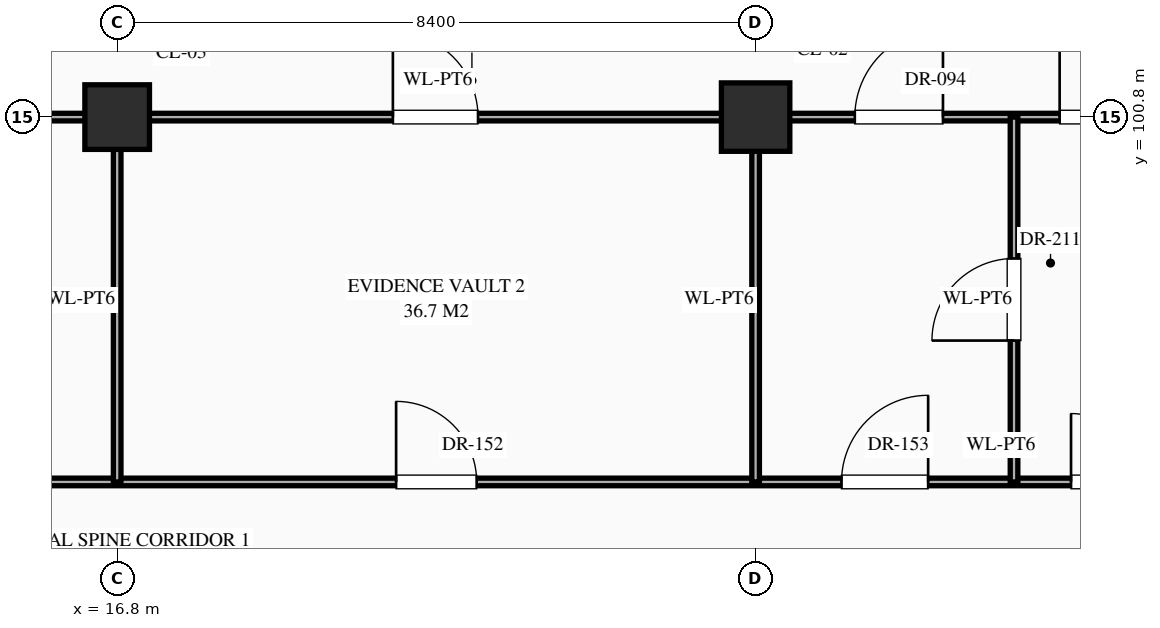
"""IFC4 building model, lengths in metres.
Left out: names, types, materials, properties, quantities, classifications, styles, units other than length and angle.
Written with IfcOpenShell. Run it as: python <this file> out.ifc"""

import sys

from ifc_helpers import new_model, si_unit, direction, frame, frame_2d, origin, origin_2d, place, context, subcontext, project, spatial, rectangle, extrude, element, fill, save


model = new_model("IFC4")
c1 = context("Model", 3, precision=1e-05, world=origin(), true_north=direction((0.0, 1.0)))
c2 = subcontext(c1, "Body", "Model", "MODEL_VIEW")
j1 = project(units=[si_unit("LENGTHUNIT", "METRE"), si_unit("PLANEANGLEUNIT", "RADIAN")], contexts=[c1])
p1 = place(None, origin())
s1 = spatial("IfcSite", under=j1, at=p1, CompositionType="ELEMENT")
p2 = place(p1, origin())
s2 = spatial("IfcBuilding", under=s1, at=p2, CompositionType="ELEMENT")
p3 = place(p2, frame((0.0, 0.0, -10.2)))
s3 = spatial("IfcBuildingStorey", under=s2, at=p3, CompositionType="ELEMENT", Elevation=-10.2)
p4 = place(p3, frame((16.8, 100.8, 0.0), z_axis=(0.0, 0.0, 1.0), x_axis=(1.0, 0.0, 0.0)))
e1 = element("IfcColumn", 1, at=p4, inside=s3, PredefinedType="COLUMN", context=c2, shape_type="SweptSolid", body=[
    extrude(rectangle(XDim=0.85, YDim=0.85, at=origin_2d()), origin(), (0.0, 0.0, 1.0), 4.8),
])
p5 = place(p3, frame((25.2, 100.8, 0.0), z_axis=(0.0, 0.0, 1.0), x_axis=(1.0, 0.0, 0.0)))
e2 = element("IfcColumn", 2, at=p5, inside=s3, PredefinedType="COLUMN", context=c2, shape_type="SweptSolid", body=[
    extrude(rectangle(XDim=0.9, YDim=0.9, at=origin_2d()), origin(), (0.0, 0.0, 1.0), 4.8),
])
p6 = place(p3, frame((0.04, 96.0, 0.0), z_axis=(0.0, 0.0, 1.0), x_axis=(1.0, 0.0, 0.0)))
e3 = element("IfcWall", 3, at=p6, inside=s3, PredefinedType="STANDARD", context=c2, shape_type="SweptSolid", body=[
    extrude(rectangle(XDim=151.16, YDim=0.1, at=frame_2d((75.58, 0.0))), origin(), (0.0, 0.0, 1.0), 4.48),
])
p7 = place(p6, frame((1.04, 0.0, 0.0)))
e4 = element("IfcOpeningElement", 4, at=p7, cuts=e3, PredefinedType="OPENING", context=c2, shape_type="SweptSolid", body=[
    extrude(rectangle(XDim=1.28, YDim=2.35, at=frame_2d((0.64, 1.175))), frame((0.0, 0.062, 0.0), z_axis=(0.0, -1.0, 0.0), x_axis=(1.0, 0.0, 0.0)), (0.0, 0.0, 1.0), 0.124),
])
p8 = place(p6, frame((4.09, 0.0, 0.0)))
e5 = element("IfcOpeningElement", 5, at=p8, cuts=e3, PredefinedType="OPENING", context=c2, shape_type="SweptSolid", body=[
    extrude(rectangle(XDim=0.94, YDim=2.3, at=frame_2d((0.47, 1.15))), frame((0.0, 0.062, 0.0), z_axis=(0.0, -1.0, 0.0), x_axis=(1.0, 0.0, 0.0)), (0.0, 0.0, 1.0), 0.124),
])
p9 = place(p6, frame((6.57, 0.0, 0.0)))
e6 = element("IfcOpeningElement", 6, at=p9, cuts=e3, PredefinedType="OPENING", context=c2, shape_type="SweptSolid", body=[
    extrude(rectangle(XDim=0.98, YDim=2.35, at=frame_2d((0.49, 1.175))), frame((0.0, 0.062, 0.0), z_axis=(0.0, -1.0, 0.0), x_axis=(1.0, 0.0, 0.0)), (0.0, 0.0, 1.0), 0.124),
])
p10 = place(p6, frame((12.05, 0.0, 0.0)))
e7 = element("IfcOpeningElement", 7, at=p10, cuts=e3, PredefinedType="OPENING", context=c2, shape_type="SweptSolid", body=[
    extrude(rectangle(XDim=1.02, YDim=2.4, at=frame_2d((0.51, 1.2))), frame((0.0, 0.062, 0.0), z_axis=(0.0, -1.0, 0.0), x_axis=(1.0, 0.0, 0.0)), (0.0, 0.0, 1.0), 0.124),
])
p11 = place(p6, frame((20.43, 0.0, 0.0)))
e8 = element("IfcOpeningElement", 8, at=p11, cuts=e3, PredefinedType="OPENING", context=c2, shape_type="SweptSolid", body=[
    extrude(rectangle(XDim=1.06, YDim=2.4, at=frame_2d((0.53, 1.2))), frame((0.0, 0.062, 0.0), z_axis=(0.0, -1.0, 0.0), x_axis=(1.0, 0.0, 0.0)), (0.0, 0.0, 1.0), 0.124),
])
p12 = place(p6, frame((26.29, 0.0, 0.0)))
e9 = element("IfcOpeningElement", 9, at=p12, cuts=e3, PredefinedType="OPENING", context=c2, shape_type="SweptSolid", body=[
    extrude(rectangle(XDim=1.14, YDim=2.4, at=frame_2d((0.57, 1.2))), frame((0.0, 0.062, 0.0), z_axis=(0.0, -1.0, 0.0), x_axis=(1.0, 0.0, 0.0)), (0.0, 0.0, 1.0), 0.124),
])
p13 = place(p6, frame((29.31, 0.0, 0.0)))
e10 = element("IfcOpeningElement", 10, at=p13, cuts=e3, PredefinedType="OPENING", context=c2, shape_type="SweptSolid", body=[
    extrude(rectangle(XDim=0.9, YDim=2.15, at=frame_2d((0.45, 1.075))), frame((0.0, 0.062, 0.0), z_axis=(0.0, -1.0, 0.0), x_axis=(1.0, 0.0, 0.0)), (0.0, 0.0, 1.0), 0.124),
])
p14 = place(p6, frame((31.83, 0.0, 0.0)))
e11 = element("IfcOpeningElement", 11, at=p14, cuts=e3, PredefinedType="OPENING", context=c2, shape_type="SweptSolid", body=[
    extrude(rectangle(XDim=0.86, YDim=2.1, at=frame_2d((0.43, 1.05))), frame((0.0, 0.062, 0.0), z_axis=(0.0, -1.0, 0.0), x_axis=(1.0, 0.0, 0.0)), (0.0, 0.0, 1.0), 0.124),
])
p15 = place(p6, frame((37.3, 0.0, 0.0)))
e12 = element("IfcOpeningElement", 12, at=p15, cuts=e3, PredefinedType="OPENING", context=c2, shape_type="SweptSolid", body=[
    extrude(rectangle(XDim=0.92, YDim=2.15, at=frame_2d((0.46, 1.075))), frame((0.0, 0.062, 0.0), z_axis=(0.0, -1.0, 0.0), x_axis=(1.0, 0.0, 0.0)), (0.0, 0.0, 1.0), 0.124),
])
p16 = place(p6, frame((45.68, 0.0, 0.0)))
e13 = element("IfcOpeningElement", 13, at=p16, cuts=e3, PredefinedType="OPENING", context=c2, shape_type="SweptSolid", body=[
    extrude(rectangle(XDim=0.96, YDim=2.2, at=frame_2d((0.48, 1.1))), frame((0.0, 0.062, 0.0), z_axis=(0.0, -1.0, 0.0), x_axis=(1.0, 0.0, 0.0)), (0.0, 0.0, 1.0), 0.124),
])
p17 = place(p6, frame((51.57, 0.0, 0.0)))
e14 = element("IfcOpeningElement", 14, at=p17, cuts=e3, PredefinedType="OPENING", context=c2, shape_type="SweptSolid", body=[
    extrude(rectangle(XDim=0.98, YDim=2.35, at=frame_2d((0.49, 1.175))), frame((0.0, 0.062, 0.0), z_axis=(0.0, -1.0, 0.0), x_axis=(1.0, 0.0, 0.0)), (0.0, 0.0, 1.0), 0.124),
])
p18 = place(p6, frame((54.45, 0.0, 0.0)))
e15 = element("IfcOpeningElement", 15, at=p18, cuts=e3, PredefinedType="OPENING", context=c2, shape_type="SweptSolid", body=[
    extrude(rectangle(XDim=1.02, YDim=2.4, at=frame_2d((0.51, 1.2))), frame((0.0, 0.062, 0.0), z_axis=(0.0, -1.0, 0.0), x_axis=(1.0, 0.0, 0.0)), (0.0, 0.0, 1.0), 0.124),
])
p19 = place(p6, frame((56.93, 0.0, 0.0)))
e16 = element("IfcOpeningElement", 16, at=p19, cuts=e3, PredefinedType="OPENING", context=c2, shape_type="SweptSolid", body=[
    extrude(rectangle(XDim=1.06, YDim=2.4, at=frame_2d((0.53, 1.2))), frame((0.0, 0.062, 0.0), z_axis=(0.0, -1.0, 0.0), x_axis=(1.0, 0.0, 0.0)), (0.0, 0.0, 1.0), 0.124),
])
p20 = place(p6, frame((62.39, 0.0, 0.0)))
e17 = element("IfcOpeningElement", 17, at=p20, cuts=e3, PredefinedType="OPENING", context=c2, shape_type="SweptSolid", body=[
    extrude(rectangle(XDim=1.14, YDim=2.4, at=frame_2d((0.57, 1.2))), frame((0.0, 0.062, 0.0), z_axis=(0.0, -1.0, 0.0), x_axis=(1.0, 0.0, 0.0)), (0.0, 0.0, 1.0), 0.124),
])
p21 = place(p6, frame((70.91, 0.0, 0.0)))
e18 = element("IfcOpeningElement", 18, at=p21, cuts=e3, PredefinedType="OPENING", context=c2, shape_type="SweptSolid", body=[
    extrude(rectangle(XDim=0.9, YDim=2.15, at=frame_2d((0.45, 1.075))), frame((0.0, 0.062, 0.0), z_axis=(0.0, -1.0, 0.0), x_axis=(1.0, 0.0, 0.0)), (0.0, 0.0, 1.0), 0.124),
])
p22 = place(p6, frame((79.33, 0.0, 0.0)))
e19 = element("IfcOpeningElement", 19, at=p22, cuts=e3, PredefinedType="OPENING", context=c2, shape_type="SweptSolid", body=[
    extrude(rectangle(XDim=0.86, YDim=2.1, at=frame_2d((0.43, 1.05))), frame((0.0, 0.062, 0.0), z_axis=(0.0, -1.0, 0.0), x_axis=(1.0, 0.0, 0.0)), (0.0, 0.0, 1.0), 0.124),
])
p23 = place(p6, frame((85.1, 0.0, 0.0)))
e20 = element("IfcOpeningElement", 20, at=p23, cuts=e3, PredefinedType="OPENING", context=c2, shape_type="SweptSolid", body=[
    extrude(rectangle(XDim=1.12, YDim=2.25, at=frame_2d((0.56, 1.125))), frame((0.0, 0.062, 0.0), z_axis=(0.0, -1.0, 0.0), x_axis=(1.0, 0.0, 0.0)), (0.0, 0.0, 1.0), 0.124),
])
p24 = place(p6, frame((87.98, 0.0, 0.0)))
e21 = element("IfcOpeningElement", 21, at=p24, cuts=e3, PredefinedType="OPENING", context=c2, shape_type="SweptSolid", body=[
    extrude(rectangle(XDim=1.16, YDim=2.3, at=frame_2d((0.58, 1.15))), frame((0.0, 0.062, 0.0), z_axis=(0.0, -1.0, 0.0), x_axis=(1.0, 0.0, 0.0)), (0.0, 0.0, 1.0), 0.124),
])
p25 = place(p6, frame((90.46, 0.0, 0.0)))
e22 = element("IfcOpeningElement", 22, at=p25, cuts=e3, PredefinedType="OPENING", context=c2, shape_type="SweptSolid", body=[
    extrude(rectangle(XDim=1.2, YDim=2.35, at=frame_2d((0.6, 1.175))), frame((0.0, 0.062, 0.0), z_axis=(0.0, -1.0, 0.0), x_axis=(1.0, 0.0, 0.0)), (0.0, 0.0, 1.0), 0.124),
])
p26 = place(p6, frame((95.94, 0.0, 0.0)))
e23 = element("IfcOpeningElement", 23, at=p26, cuts=e3, PredefinedType="OPENING", context=c2, shape_type="SweptSolid", body=[
    extrude(rectangle(XDim=1.24, YDim=2.3, at=frame_2d((0.62, 1.15))), frame((0.0, 0.062, 0.0), z_axis=(0.0, -1.0, 0.0), x_axis=(1.0, 0.0, 0.0)), (0.0, 0.0, 1.0), 0.124),
])
p27 = place(p6, frame((104.32, 0.0, 0.0)))
e24 = element("IfcOpeningElement", 24, at=p27, cuts=e3, PredefinedType="OPENING", context=c2, shape_type="SweptSolid", body=[
    extrude(rectangle(XDim=1.28, YDim=2.35, at=frame_2d((0.64, 1.175))), frame((0.0, 0.062, 0.0), z_axis=(0.0, -1.0, 0.0), x_axis=(1.0, 0.0, 0.0)), (0.0, 0.0, 1.0), 0.124),
])
p28 = place(p6, frame((110.39, 0.0, 0.0)))
e25 = element("IfcOpeningElement", 25, at=p28, cuts=e3, PredefinedType="OPENING", context=c2, shape_type="SweptSolid", body=[
    extrude(rectangle(XDim=0.94, YDim=2.3, at=frame_2d((0.47, 1.15))), frame((0.0, 0.062, 0.0), z_axis=(0.0, -1.0, 0.0), x_axis=(1.0, 0.0, 0.0)), (0.0, 0.0, 1.0), 0.124),
])
p29 = place(p6, frame((113.27, 0.0, 0.0)))
e26 = element("IfcOpeningElement", 26, at=p29, cuts=e3, PredefinedType="OPENING", context=c2, shape_type="SweptSolid", body=[
    extrude(rectangle(XDim=0.98, YDim=2.35, at=frame_2d((0.49, 1.175))), frame((0.0, 0.062, 0.0), z_axis=(0.0, -1.0, 0.0), x_axis=(1.0, 0.0, 0.0)), (0.0, 0.0, 1.0), 0.124),
])
p30 = place(p6, frame((115.75, 0.0, 0.0)))
e27 = element("IfcOpeningElement", 27, at=p30, cuts=e3, PredefinedType="OPENING", context=c2, shape_type="SweptSolid", body=[
    extrude(rectangle(XDim=1.02, YDim=2.4, at=frame_2d((0.51, 1.2))), frame((0.0, 0.062, 0.0), z_axis=(0.0, -1.0, 0.0), x_axis=(1.0, 0.0, 0.0)), (0.0, 0.0, 1.0), 0.124),
])
p31 = place(p6, frame((121.24, 0.0, 0.0)))
e28 = element("IfcOpeningElement", 28, at=p31, cuts=e3, PredefinedType="OPENING", context=c2, shape_type="SweptSolid", body=[
    extrude(rectangle(XDim=1.04, YDim=2.2, at=frame_2d((0.52, 1.1))), frame((0.0, 0.062, 0.0), z_axis=(0.0, -1.0, 0.0), x_axis=(1.0, 0.0, 0.0)), (0.0, 0.0, 1.0), 0.124),
])
p32 = place(p6, frame((129.62, 0.0, 0.0)))
e29 = element("IfcOpeningElement", 29, at=p32, cuts=e3, PredefinedType="OPENING", context=c2, shape_type="SweptSolid", body=[
    extrude(rectangle(XDim=1.08, YDim=2.25, at=frame_2d((0.54, 1.125))), frame((0.0, 0.062, 0.0), z_axis=(0.0, -1.0, 0.0), x_axis=(1.0, 0.0, 0.0)), (0.0, 0.0, 1.0), 0.124),
])
p33 = place(p6, frame((135.5, 0.0, 0.0)))
e30 = element("IfcOpeningElement", 30, at=p33, cuts=e3, PredefinedType="OPENING", context=c2, shape_type="SweptSolid", body=[
    extrude(rectangle(XDim=1.12, YDim=2.25, at=frame_2d((0.56, 1.125))), frame((0.0, 0.062, 0.0), z_axis=(0.0, -1.0, 0.0), x_axis=(1.0, 0.0, 0.0)), (0.0, 0.0, 1.0), 0.124),
])
p34 = place(p6, frame((138.38, 0.0, 0.0)))
e31 = element("IfcOpeningElement", 31, at=p34, cuts=e3, PredefinedType="OPENING", context=c2, shape_type="SweptSolid", body=[
    extrude(rectangle(XDim=1.16, YDim=2.3, at=frame_2d((0.58, 1.15))), frame((0.0, 0.062, 0.0), z_axis=(0.0, -1.0, 0.0), x_axis=(1.0, 0.0, 0.0)), (0.0, 0.0, 1.0), 0.124),
])
p35 = place(p6, frame((140.86, 0.0, 0.0)))
e32 = element("IfcOpeningElement", 32, at=p35, cuts=e3, PredefinedType="OPENING", context=c2, shape_type="SweptSolid", body=[
    extrude(rectangle(XDim=1.2, YDim=2.35, at=frame_2d((0.6, 1.175))), frame((0.0, 0.062, 0.0), z_axis=(0.0, -1.0, 0.0), x_axis=(1.0, 0.0, 0.0)), (0.0, 0.0, 1.0), 0.124),
])
p36 = place(p6, frame((146.34, 0.0, 0.0)))
e33 = element("IfcOpeningElement", 33, at=p36, cuts=e3, PredefinedType="OPENING", context=c2, shape_type="SweptSolid", body=[
    extrude(rectangle(XDim=1.24, YDim=2.3, at=frame_2d((0.62, 1.15))), frame((0.0, 0.062, 0.0), z_axis=(0.0, -1.0, 0.0), x_axis=(1.0, 0.0, 0.0)), (0.0, 0.0, 1.0), 0.124),
])
p37 = place(p3, frame((0.04, 100.8, 0.0), z_axis=(0.0, 0.0, 1.0), x_axis=(1.0, 0.0, 0.0)))
e34 = element("IfcWall", 34, at=p37, inside=s3, PredefinedType="STANDARD", context=c2, shape_type="SweptSolid", body=[
    extrude(rectangle(XDim=41.96, YDim=0.1, at=frame_2d((20.98, 0.0))), origin(), (0.0, 0.0, 1.0), 3.63),
])
p38 = place(p37, frame((1.353, 0.0, 0.0)))
e35 = element("IfcOpeningElement", 35, at=p38, cuts=e34, PredefinedType="OPENING", context=c2, shape_type="SweptSolid", body=[
    extrude(rectangle(XDim=0.96, YDim=2.2, at=frame_2d((0.48, 1.1))), frame((0.0, 0.062, 0.0), z_axis=(0.0, -1.0, 0.0), x_axis=(1.0, 0.0, 0.0)), (0.0, 0.0, 1.0), 0.124),
])
p39 = place(p37, frame((4.06, 0.0, 0.0)))
e36 = element("IfcOpeningElement", 36, at=p39, cuts=e34, PredefinedType="OPENING", context=c2, shape_type="SweptSolid", body=[
    extrude(rectangle(XDim=1.0, YDim=2.25, at=frame_2d((0.5, 1.125))), frame((0.0, 0.062, 0.0), z_axis=(0.0, -1.0, 0.0), x_axis=(1.0, 0.0, 0.0)), (0.0, 0.0, 1.0), 0.124),
])
p40 = place(p37, frame((6.367, 0.0, 0.0)))
e37 = element("IfcOpeningElement", 37, at=p40, cuts=e34, PredefinedType="OPENING", context=c2, shape_type="SweptSolid", body=[
    extrude(rectangle(XDim=1.04, YDim=2.2, at=frame_2d((0.52, 1.1))), frame((0.0, 0.062, 0.0), z_axis=(0.0, -1.0, 0.0), x_axis=(1.0, 0.0, 0.0)), (0.0, 0.0, 1.0), 0.124),
])
p41 = place(p37, frame((12.02, 0.0, 0.0)))
e38 = element("IfcOpeningElement", 38, at=p41, cuts=e34, PredefinedType="OPENING", context=c2, shape_type="SweptSolid", body=[
    extrude(rectangle(XDim=1.08, YDim=2.25, at=frame_2d((0.54, 1.125))), frame((0.0, 0.062, 0.0), z_axis=(0.0, -1.0, 0.0), x_axis=(1.0, 0.0, 0.0)), (0.0, 0.0, 1.0), 0.124),
])
p42 = place(p37, frame((20.387, 0.0, 0.0)))
e39 = element("IfcOpeningElement", 39, at=p42, cuts=e34, PredefinedType="OPENING", context=c2, shape_type="SweptSolid", body=[
    extrude(rectangle(XDim=1.12, YDim=2.25, at=frame_2d((0.56, 1.125))), frame((0.0, 0.062, 0.0), z_axis=(0.0, -1.0, 0.0), x_axis=(1.0, 0.0, 0.0)), (0.0, 0.0, 1.0), 0.124),
])
p43 = place(p37, frame((26.465, 0.0, 0.0)))
e40 = element("IfcOpeningElement", 40, at=p43, cuts=e34, PredefinedType="OPENING", context=c2, shape_type="SweptSolid", body=[
    extrude(rectangle(XDim=1.16, YDim=2.3, at=frame_2d((0.58, 1.15))), frame((0.0, 0.062, 0.0), z_axis=(0.0, -1.0, 0.0), x_axis=(1.0, 0.0, 0.0)), (0.0, 0.0, 1.0), 0.124),
])
p44 = place(p37, frame((29.16, 0.0, 0.0)))
e41 = element("IfcOpeningElement", 41, at=p44, cuts=e34, PredefinedType="OPENING", context=c2, shape_type="SweptSolid", body=[
    extrude(rectangle(XDim=1.2, YDim=2.35, at=frame_2d((0.6, 1.175))), frame((0.0, 0.062, 0.0), z_axis=(0.0, -1.0, 0.0), x_axis=(1.0, 0.0, 0.0)), (0.0, 0.0, 1.0), 0.124),
])
p45 = place(p37, frame((31.455, 0.0, 0.0)))
e42 = element("IfcOpeningElement", 42, at=p45, cuts=e34, PredefinedType="OPENING", context=c2, shape_type="SweptSolid", body=[
    extrude(rectangle(XDim=1.24, YDim=2.3, at=frame_2d((0.62, 1.15))), frame((0.0, 0.062, 0.0), z_axis=(0.0, -1.0, 0.0), x_axis=(1.0, 0.0, 0.0)), (0.0, 0.0, 1.0), 0.124),
])
p46 = place(p37, frame((37.12, 0.0, 0.0)))
e43 = element("IfcOpeningElement", 43, at=p46, cuts=e34, PredefinedType="OPENING", context=c2, shape_type="SweptSolid", body=[
    extrude(rectangle(XDim=1.28, YDim=2.35, at=frame_2d((0.64, 1.175))), frame((0.0, 0.062, 0.0), z_axis=(0.0, -1.0, 0.0), x_axis=(1.0, 0.0, 0.0)), (0.0, 0.0, 1.0), 0.124),
])
for number, where, z_axis, x_axis in (
    (44, (16.8, 96.0, 0.0), (0.0, 0.0, 1.0), (0.0, 1.0, 0.0)),
    (45, (25.2, 96.0, 0.0), (0.0, 0.0, 1.0), (0.0, 1.0, 0.0)),
):
    element("IfcWall", number, at=place(p3, frame(where, z_axis=z_axis, x_axis=x_axis)), inside=s3, PredefinedType="STANDARD", context=c2, shape_type="SweptSolid", body=[
        extrude(rectangle(XDim=4.8, YDim=0.1, at=frame_2d((2.4, 0.0))), origin(), (0.0, 0.0, 1.0), 3.73),
    ])
p47 = place(p3, frame((28.6, 96.0, 0.0), z_axis=(0.0, 0.0, 1.0), x_axis=(0.0, 1.0, 0.0)))
e46 = element("IfcWall", 46, at=p47, inside=s3, PredefinedType="STANDARD", context=c2, shape_type="SweptSolid", body=[
    extrude(rectangle(XDim=4.8, YDim=0.1, at=frame_2d((2.4, 0.0))), origin(), (0.0, 0.0, 1.0), 4.48),
])
p48 = place(p47, frame((1.86, 0.0, 0.0)))
e47 = element("IfcOpeningElement", 47, at=p48, cuts=e46, PredefinedType="OPENING", context=c2, shape_type="SweptSolid", body=[
    extrude(rectangle(XDim=1.08, YDim=2.25, at=frame_2d((0.54, 1.125))), frame((0.0, 0.062, 0.0), z_axis=(0.0, -1.0, 0.0), x_axis=(1.0, 0.0, 0.0)), (0.0, 0.0, 1.0), 0.124),
])
p49 = place(p42, origin())
e48 = element("IfcDoor", 48, at=p49, inside=s3, OperationType="SINGLE_SWING_LEFT", PredefinedType="DOOR", context=c2, shape_type="SweptSolid", body=[
    extrude(rectangle(XDim=1.12, YDim=2.25, at=frame_2d((0.56, 1.125))), frame((0.0, 0.025, 0.0), z_axis=(0.0, -1.0, 0.0), x_axis=(1.0, 0.0, 0.0)), (0.0, 0.0, 1.0), 0.05),
])
fill(e39, e48)
p50 = place(p43, origin())
e49 = element("IfcDoor", 49, at=p50, inside=s3, OperationType="SINGLE_SWING_RIGHT", PredefinedType="DOOR", context=c2, shape_type="SweptSolid", body=[
    extrude(rectangle(XDim=1.16, YDim=2.3, at=frame_2d((0.58, 1.15))), frame((0.0, 0.025, 0.0), z_axis=(0.0, -1.0, 0.0), x_axis=(1.0, 0.0, 0.0)), (0.0, 0.0, 1.0), 0.05),
])
fill(e40, e49)
p51 = place(p44, origin())
e50 = element("IfcDoor", 50, at=p51, inside=s3, OperationType="SINGLE_SWING_LEFT", PredefinedType="DOOR", context=c2, shape_type="SweptSolid", body=[
    extrude(rectangle(XDim=1.2, YDim=2.35, at=frame_2d((0.6, 1.175))), frame((0.0, 0.025, 0.0), z_axis=(0.0, -1.0, 0.0), x_axis=(1.0, 0.0, 0.0)), (0.0, 0.0, 1.0), 0.05),
])
fill(e41, e50)
p52 = place(p11, origin())
e51 = element("IfcDoor", 51, at=p52, inside=s3, OperationType="SINGLE_SWING_LEFT", PredefinedType="DOOR", context=c2, shape_type="SweptSolid", body=[
    extrude(rectangle(XDim=1.06, YDim=2.4, at=frame_2d((0.53, 1.2))), frame((0.0, 0.025, 0.0), z_axis=(0.0, -1.0, 0.0), x_axis=(1.0, 0.0, 0.0)), (0.0, 0.0, 1.0), 0.05),
])
fill(e8, e51)
p53 = place(p12, origin())
e52 = element("IfcDoor", 52, at=p53, inside=s3, OperationType="SINGLE_SWING_RIGHT", PredefinedType="DOOR", context=c2, shape_type="SweptSolid", body=[
    extrude(rectangle(XDim=1.14, YDim=2.4, at=frame_2d((0.57, 1.2))), frame((0.0, 0.025, 0.0), z_axis=(0.0, -1.0, 0.0), x_axis=(1.0, 0.0, 0.0)), (0.0, 0.0, 1.0), 0.05),
])
fill(e9, e52)
p54 = place(p13, origin())
e53 = element("IfcDoor", 53, at=p54, inside=s3, OperationType="SINGLE_SWING_LEFT", PredefinedType="DOOR", context=c2, shape_type="SweptSolid", body=[
    extrude(rectangle(XDim=0.9, YDim=2.15, at=frame_2d((0.45, 1.075))), frame((0.0, 0.025, 0.0), z_axis=(0.0, -1.0, 0.0), x_axis=(1.0, 0.0, 0.0)), (0.0, 0.0, 1.0), 0.05),
])
fill(e10, e53)
p55 = place(p48, origin())
e54 = element("IfcDoor", 54, at=p55, inside=s3, OperationType="SINGLE_SWING_LEFT", PredefinedType="DOOR", context=c2, shape_type="SweptSolid", body=[
    extrude(rectangle(XDim=1.08, YDim=2.25, at=frame_2d((0.54, 1.125))), frame((0.0, 0.025, 0.0), z_axis=(0.0, -1.0, 0.0), x_axis=(1.0, 0.0, 0.0)), (0.0, 0.0, 1.0), 0.05),
])
fill(e47, e54)
save(model, sys.argv[1])
